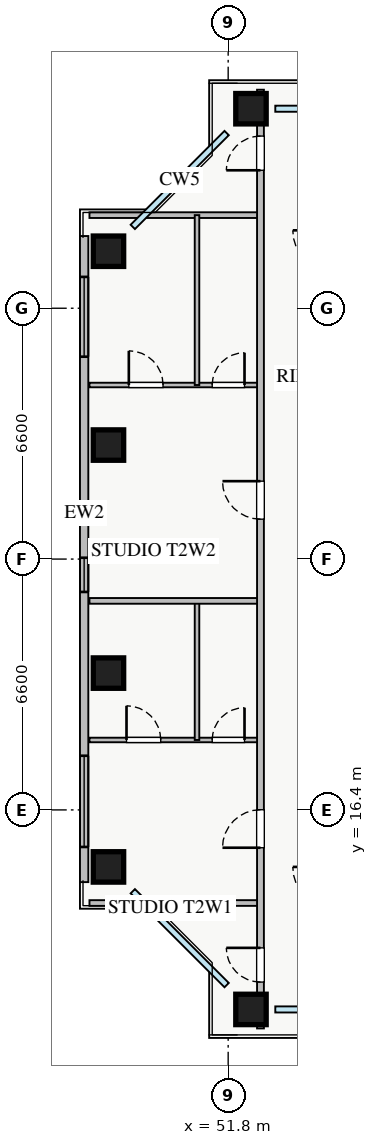
"""IFC4 building model, lengths in metres.
Left out: names, types, materials, properties, quantities, classifications, styles, units other than length and angle.
Written with IfcOpenShell. Run it as: python <this file> out.ifc"""

import sys

from ifc_helpers import new_model, si_unit, direction, frame, frame_2d, origin, origin_2d, place, context, subcontext, project, spatial, rectangle, extrude, source, transform, mapped, element, fill, save


model = new_model("IFC4")
c1 = context("Model", 3, precision=1e-05, world=origin(), true_north=direction((0.0, 1.0)))
c2 = subcontext(c1, "Body", "Model", "MODEL_VIEW")
j1 = project(units=[si_unit("LENGTHUNIT", "METRE"), si_unit("PLANEANGLEUNIT", "RADIAN")], contexts=[c1])
p1 = place(None, origin())
s1 = spatial("IfcSite", under=j1, at=p1, CompositionType="ELEMENT")
p2 = place(p1, origin())
s2 = spatial("IfcBuilding", under=s1, at=p2, CompositionType="ELEMENT")
p3 = place(p2, frame((0.0, 0.0, 79.5)))
s3 = spatial("IfcBuildingStorey", under=s2, at=p3, CompositionType="ELEMENT", Elevation=79.5)
m1 = source(origin(), c2, "Body", "SweptSolid", [
    extrude(rectangle(XDim=0.8, YDim=0.8, at=origin_2d()), origin(), (0.0, 0.0, 1.0), 3.25),
])
for number, where, z_axis, x_axis in (
    (1, (52.4, 11.15, 0.0), (0.0, 0.0, 1.0), (1.0, 0.0, 0.0)),
    (2, (52.4, 34.85, 0.0), (0.0, 0.0, 1.0), (1.0, 0.0, 0.0)),
    (3, (48.65, 14.9, 0.0), (0.0, 0.0, 1.0), (1.0, 0.0, 0.0)),
    (4, (48.65, 20.0, 0.0), (0.0, 0.0, 1.0), (1.0, 0.0, 0.0)),
    (5, (48.65, 26.0, 0.0), (0.0, 0.0, 1.0), (1.0, 0.0, 0.0)),
    (6, (48.65, 31.1, 0.0), (0.0, 0.0, 1.0), (1.0, 0.0, 0.0)),
):
    element("IfcColumn", number, at=place(p3, frame(where, z_axis=z_axis, x_axis=x_axis)), inside=s3, PredefinedType="COLUMN", context=c2, shape_type="MappedRepresentation", body=[
        mapped(m1, transform((0.0, 0.0, 0.0), x_axis=(1.0, 0.0, 0.0), y_axis=(0.0, 1.0, 0.0), z_axis=(0.0, 0.0, 1.0), scale=1.0)),
    ])
p4 = place(p3, frame((48.01, 14.5, 0.0), z_axis=(0.0, 0.0, 1.0), x_axis=(0.0, 1.0, 0.0)))
e7 = element("IfcWall", 7, at=p4, inside=s3, PredefinedType="STANDARD", context=c2, shape_type="SweptSolid", body=[
    extrude(rectangle(XDim=17.0, YDim=0.22, at=frame_2d((8.5, 0.0))), origin(), (0.0, 0.0, 1.0), 2.61),
])
p5 = place(p4, frame((0.925, 0.0, 0.9)))
e8 = element("IfcOpeningElement", 8, at=p5, cuts=e7, PredefinedType="OPENING", context=c2, shape_type="SweptSolid", body=[
    extrude(rectangle(XDim=2.4, YDim=1.48, at=frame_2d((1.2, 0.74))), frame((0.0, 0.12, 0.0), z_axis=(0.0, -1.0, 0.0), x_axis=(1.0, 0.0, 0.0)), (0.0, 0.0, 1.0), 0.24),
])
p6 = place(p4, frame((13.825, 0.0, 0.9)))
e9 = element("IfcOpeningElement", 9, at=p6, cuts=e7, PredefinedType="OPENING", context=c2, shape_type="SweptSolid", body=[
    extrude(rectangle(XDim=2.1, YDim=1.48, at=frame_2d((1.05, 0.74))), frame((0.0, 0.12, 0.0), z_axis=(0.0, -1.0, 0.0), x_axis=(1.0, 0.0, 0.0)), (0.0, 0.0, 1.0), 0.24),
])
p7 = place(p4, frame((7.635, 0.0, 0.9)))
e10 = element("IfcOpeningElement", 10, at=p7, cuts=e7, PredefinedType="OPENING", context=c2, shape_type="SweptSolid", body=[
    extrude(rectangle(XDim=0.9, YDim=1.2, at=frame_2d((0.45, 0.6))), frame((0.0, 0.12, 0.0), z_axis=(0.0, -1.0, 0.0), x_axis=(1.0, 0.0, 0.0)), (0.0, 0.0, 1.0), 0.24),
])
for number, where, z_axis, x_axis in (
    (11, (48.15, 32.05, 0.0), (0.0, 0.0, 1.0), (1.0, 0.0, 0.0)),
    (12, (48.15, 13.95, 0.0), (0.0, 0.0, 1.0), (1.0, 0.0, 0.0)),
):
    element("IfcWall", number, at=place(p3, frame(where, z_axis=z_axis, x_axis=x_axis)), inside=s3, PredefinedType="PARTITIONING", context=c2, shape_type="SweptSolid", body=[
        extrude(rectangle(XDim=4.5, YDim=0.15, at=frame_2d((2.25, 0.0))), origin(), (0.0, 0.0, 1.0), 3.07),
    ])
p8 = place(p3, frame((48.15, 18.24, 0.0), z_axis=(0.0, 0.0, 1.0), x_axis=(1.0, 0.0, 0.0)))
e13 = element("IfcWall", 13, at=p8, inside=s3, PredefinedType="PLUMBINGWALL", context=c2, shape_type="SweptSolid", body=[
    extrude(rectangle(XDim=4.5, YDim=0.12, at=frame_2d((2.25, 0.0))), origin(), (0.0, 0.0, 1.0), 3.07),
])
p9 = place(p8, frame((0.975, 0.0, 0.0)))
e14 = element("IfcOpeningElement", 14, at=p9, cuts=e13, PredefinedType="OPENING", context=c2, shape_type="SweptSolid", body=[
    extrude(rectangle(XDim=0.9, YDim=2.05, at=frame_2d((0.45, 1.025))), frame((0.0, 0.07, 0.0), z_axis=(0.0, -1.0, 0.0), x_axis=(1.0, 0.0, 0.0)), (0.0, 0.0, 1.0), 0.14),
])
p10 = place(p8, frame((3.23, 0.0, 0.0)))
e15 = element("IfcOpeningElement", 15, at=p10, cuts=e13, PredefinedType="OPENING", context=c2, shape_type="SweptSolid", body=[
    extrude(rectangle(XDim=0.85, YDim=2.05, at=frame_2d((0.425, 1.025))), frame((0.0, 0.07, 0.0), z_axis=(0.0, -1.0, 0.0), x_axis=(1.0, 0.0, 0.0)), (0.0, 0.0, 1.0), 0.14),
])
p11 = place(p3, frame((50.98, 18.24, 0.0), z_axis=(0.0, 0.0, 1.0), x_axis=(0.0, 1.0, 0.0)))
e16 = element("IfcWall", 16, at=p11, inside=s3, PredefinedType="PLUMBINGWALL", context=c2, shape_type="SweptSolid", body=[
    extrude(rectangle(XDim=3.66, YDim=0.12, at=frame_2d((1.83, 0.0))), origin(), (0.0, 0.0, 1.0), 3.07),
])
p12 = place(p3, frame((48.15, 27.58, 0.0), z_axis=(0.0, 0.0, 1.0), x_axis=(1.0, 0.0, 0.0)))
e17 = element("IfcWall", 17, at=p12, inside=s3, PredefinedType="PLUMBINGWALL", context=c2, shape_type="SweptSolid", body=[
    extrude(rectangle(XDim=4.5, YDim=0.12, at=frame_2d((2.25, 0.0))), origin(), (0.0, 0.0, 1.0), 2.765),
])
p13 = place(p12, frame((1.036, 0.0, 0.0)))
e18 = element("IfcOpeningElement", 18, at=p13, cuts=e17, PredefinedType="OPENING", context=c2, shape_type="SweptSolid", body=[
    extrude(rectangle(XDim=0.9, YDim=2.05, at=frame_2d((0.45, 1.025))), frame((0.0, 0.07, 0.0), z_axis=(0.0, -1.0, 0.0), x_axis=(1.0, 0.0, 0.0)), (0.0, 0.0, 1.0), 0.14),
])
p14 = place(p12, frame((3.23, 0.0, 0.0)))
e19 = element("IfcOpeningElement", 19, at=p14, cuts=e17, PredefinedType="OPENING", context=c2, shape_type="SweptSolid", body=[
    extrude(rectangle(XDim=0.85, YDim=2.05, at=frame_2d((0.425, 1.025))), frame((0.0, 0.07, 0.0), z_axis=(0.0, -1.0, 0.0), x_axis=(1.0, 0.0, 0.0)), (0.0, 0.0, 1.0), 0.14),
])
p15 = place(p3, frame((50.98, 27.58, 0.0), z_axis=(0.0, 0.0, 1.0), x_axis=(0.0, 1.0, 0.0)))
e20 = element("IfcWall", 20, at=p15, inside=s3, PredefinedType="PLUMBINGWALL", context=c2, shape_type="SweptSolid", body=[
    extrude(rectangle(XDim=4.47, YDim=0.12, at=frame_2d((2.235, 0.0))), origin(), (0.0, 0.0, 1.0), 3.07),
])
p16 = place(p3, frame((48.15, 21.9, 0.0), z_axis=(0.0, 0.0, 1.0), x_axis=(1.0, 0.0, 0.0)))
e21 = element("IfcWall", 21, at=p16, inside=s3, PredefinedType="PARTITIONING", context=c2, shape_type="SweptSolid", body=[
    extrude(rectangle(XDim=4.5, YDim=0.15, at=frame_2d((2.25, 0.0))), origin(), (0.0, 0.0, 1.0), 3.07),
])
p17 = place(p3, frame((52.65, 10.65, 0.0), z_axis=(0.0, 0.0, 1.0), x_axis=(0.0, 1.0, 0.0)))
e22 = element("IfcWall", 22, at=p17, inside=s3, PredefinedType="PARTITIONING", context=c2, shape_type="SweptSolid", body=[
    extrude(rectangle(XDim=24.7, YDim=0.18, at=frame_2d((12.35, 0.0))), origin(), (0.0, 0.0, 1.0), 2.615),
])
p18 = place(p17, frame((22.58, 0.0, 0.0)))
e23 = element("IfcOpeningElement", 23, at=p18, cuts=e22, PredefinedType="OPENING", context=c2, shape_type="SweptSolid", body=[
    extrude(rectangle(XDim=0.9, YDim=2.05, at=frame_2d((0.45, 1.025))), frame((0.0, 0.1, 0.0), z_axis=(0.0, -1.0, 0.0), x_axis=(1.0, 0.0, 0.0)), (0.0, 0.0, 1.0), 0.2),
])
p19 = place(p17, frame((1.22, 0.0, 0.0)))
e24 = element("IfcOpeningElement", 24, at=p19, cuts=e22, PredefinedType="OPENING", context=c2, shape_type="SweptSolid", body=[
    extrude(rectangle(XDim=0.9, YDim=2.05, at=frame_2d((0.45, 1.025))), frame((0.0, 0.1, 0.0), z_axis=(0.0, -1.0, 0.0), x_axis=(1.0, 0.0, 0.0)), (0.0, 0.0, 1.0), 0.2),
])
p20 = place(p17, frame((4.755, 0.0, 0.0)))
e25 = element("IfcOpeningElement", 25, at=p20, cuts=e22, PredefinedType="OPENING", context=c2, shape_type="SweptSolid", body=[
    extrude(rectangle(XDim=1.0, YDim=2.05, at=frame_2d((0.5, 1.025))), frame((0.0, 0.1, 0.0), z_axis=(0.0, -1.0, 0.0), x_axis=(1.0, 0.0, 0.0)), (0.0, 0.0, 1.0), 0.2),
])
p21 = place(p17, frame((13.4, 0.0, 0.0)))
e26 = element("IfcOpeningElement", 26, at=p21, cuts=e22, PredefinedType="OPENING", context=c2, shape_type="SweptSolid", body=[
    extrude(rectangle(XDim=1.0, YDim=2.05, at=frame_2d((0.5, 1.025))), frame((0.0, 0.1, 0.0), z_axis=(0.0, -1.0, 0.0), x_axis=(1.0, 0.0, 0.0)), (0.0, 0.0, 1.0), 0.2),
])
m2 = source(origin(), c2, "Body", "SweptSolid", [
    extrude(rectangle(XDim=2.4, YDim=1.48, at=frame_2d((1.2, 0.74))), frame((0.0, 0.03, 0.0), z_axis=(0.0, -1.0, 0.0), x_axis=(1.0, 0.0, 0.0)), (0.0, 0.0, 1.0), 0.06),
])
p22 = place(p5, origin())
e27 = element("IfcWindow", 27, at=p22, inside=s3, PartitioningType="TRIPLE_PANEL_VERTICAL", PredefinedType="WINDOW", context=c2, shape_type="MappedRepresentation", body=[
    mapped(m2, transform((0.0, 0.0, 0.0), x_axis=(1.0, 0.0, 0.0), y_axis=(0.0, 1.0, 0.0), z_axis=(0.0, 0.0, 1.0), scale=1.0)),
])
fill(e8, e27)
m3 = source(origin(), c2, "Body", "SweptSolid", [
    extrude(rectangle(XDim=2.1, YDim=1.48, at=frame_2d((1.05, 0.74))), frame((0.0, 0.03, 0.0), z_axis=(0.0, -1.0, 0.0), x_axis=(1.0, 0.0, 0.0)), (0.0, 0.0, 1.0), 0.06),
])
p23 = place(p6, origin())
e28 = element("IfcWindow", 28, at=p23, inside=s3, PartitioningType="TRIPLE_PANEL_VERTICAL", PredefinedType="WINDOW", context=c2, shape_type="MappedRepresentation", body=[
    mapped(m3, transform((0.0, 0.0, 0.0), x_axis=(1.0, 0.0, 0.0), y_axis=(0.0, 1.0, 0.0), z_axis=(0.0, 0.0, 1.0), scale=1.0)),
])
fill(e9, e28)
m4 = source(origin(), c2, "Body", "SweptSolid", [
    extrude(rectangle(XDim=0.9, YDim=2.05, at=frame_2d((0.45, 1.025))), frame((0.0, 0.025, 0.0), z_axis=(0.0, -1.0, 0.0), x_axis=(1.0, 0.0, 0.0)), (0.0, 0.0, 1.0), 0.05),
])
p24 = place(p9, origin())
e29 = element("IfcDoor", 29, at=p24, inside=s3, OperationType="SINGLE_SWING_LEFT", PredefinedType="DOOR", context=c2, shape_type="MappedRepresentation", body=[
    mapped(m4, transform((0.0, 0.0, 0.0), x_axis=(1.0, 0.0, 0.0), y_axis=(0.0, 1.0, 0.0), z_axis=(0.0, 0.0, 1.0), scale=1.0)),
])
fill(e14, e29)
m5 = source(origin(), c2, "Body", "SweptSolid", [
    extrude(rectangle(XDim=0.85, YDim=2.05, at=frame_2d((0.425, 1.025))), frame((0.0, 0.025, 0.0), z_axis=(0.0, -1.0, 0.0), x_axis=(1.0, 0.0, 0.0)), (0.0, 0.0, 1.0), 0.05),
])
p25 = place(p10, origin())
e30 = element("IfcDoor", 30, at=p25, inside=s3, OperationType="SINGLE_SWING_RIGHT", PredefinedType="DOOR", context=c2, shape_type="MappedRepresentation", body=[
    mapped(m5, transform((0.0, 0.0, 0.0), x_axis=(1.0, 0.0, 0.0), y_axis=(0.0, 1.0, 0.0), z_axis=(0.0, 0.0, 1.0), scale=1.0)),
])
fill(e15, e30)
p26 = place(p13, origin())
e31 = element("IfcDoor", 31, at=p26, inside=s3, OperationType="SINGLE_SWING_LEFT", PredefinedType="DOOR", context=c2, shape_type="MappedRepresentation", body=[
    mapped(m4, transform((0.0, 0.0, 0.0), x_axis=(1.0, 0.0, 0.0), y_axis=(0.0, 1.0, 0.0), z_axis=(0.0, 0.0, 1.0), scale=1.0)),
])
fill(e18, e31)
p27 = place(p14, origin())
e32 = element("IfcDoor", 32, at=p27, inside=s3, OperationType="SINGLE_SWING_RIGHT", PredefinedType="DOOR", context=c2, shape_type="MappedRepresentation", body=[
    mapped(m5, transform((0.0, 0.0, 0.0), x_axis=(1.0, 0.0, 0.0), y_axis=(0.0, 1.0, 0.0), z_axis=(0.0, 0.0, 1.0), scale=1.0)),
])
fill(e19, e32)
p28 = place(p18, origin())
e33 = element("IfcDoor", 33, at=p28, inside=s3, OperationType="SINGLE_SWING_LEFT", PredefinedType="DOOR", context=c2, shape_type="MappedRepresentation", body=[
    mapped(m4, transform((0.0, 0.0, 0.0), x_axis=(1.0, 0.0, 0.0), y_axis=(0.0, 1.0, 0.0), z_axis=(0.0, 0.0, 1.0), scale=1.0)),
])
fill(e23, e33)
p29 = place(p19, origin())
e34 = element("IfcDoor", 34, at=p29, inside=s3, OperationType="SINGLE_SWING_RIGHT", PredefinedType="DOOR", context=c2, shape_type="MappedRepresentation", body=[
    mapped(m4, transform((0.0, 0.0, 0.0), x_axis=(1.0, 0.0, 0.0), y_axis=(0.0, 1.0, 0.0), z_axis=(0.0, 0.0, 1.0), scale=1.0)),
])
fill(e24, e34)
m6 = source(origin(), c2, "Body", "SweptSolid", [
    extrude(rectangle(XDim=1.0, YDim=2.05, at=frame_2d((0.5, 1.025))), frame((0.0, 0.025, 0.0), z_axis=(0.0, -1.0, 0.0), x_axis=(1.0, 0.0, 0.0)), (0.0, 0.0, 1.0), 0.05),
])
p30 = place(p20, origin())
e35 = element("IfcDoor", 35, at=p30, inside=s3, OperationType="SINGLE_SWING_LEFT", PredefinedType="DOOR", context=c2, shape_type="MappedRepresentation", body=[
    mapped(m6, transform((0.0, 0.0, 0.0), x_axis=(1.0, 0.0, 0.0), y_axis=(0.0, 1.0, 0.0), z_axis=(0.0, 0.0, 1.0), scale=1.0)),
])
fill(e25, e35)
p31 = place(p21, origin())
e36 = element("IfcDoor", 36, at=p31, inside=s3, OperationType="SINGLE_SWING_RIGHT", PredefinedType="DOOR", context=c2, shape_type="MappedRepresentation", body=[
    mapped(m6, transform((0.0, 0.0, 0.0), x_axis=(1.0, 0.0, 0.0), y_axis=(0.0, 1.0, 0.0), z_axis=(0.0, 0.0, 1.0), scale=1.0)),
])
fill(e26, e36)
m7 = source(origin(), c2, "Body", "SweptSolid", [
    extrude(rectangle(XDim=0.9, YDim=1.2, at=frame_2d((0.45, 0.6))), frame((0.0, 0.03, 0.0), z_axis=(0.0, -1.0, 0.0), x_axis=(1.0, 0.0, 0.0)), (0.0, 0.0, 1.0), 0.06),
])
p32 = place(p7, origin())
e37 = element("IfcWindow", 37, at=p32, inside=s3, PartitioningType="SINGLE_PANEL", PredefinedType="WINDOW", context=c2, shape_type="MappedRepresentation", body=[
    mapped(m7, transform((0.0, 0.0, 0.0), x_axis=(1.0, 0.0, 0.0), y_axis=(0.0, 1.0, 0.0), z_axis=(0.0, 0.0, 1.0), scale=1.0)),
])
fill(e10, e37)
save(model, sys.argv[1])
